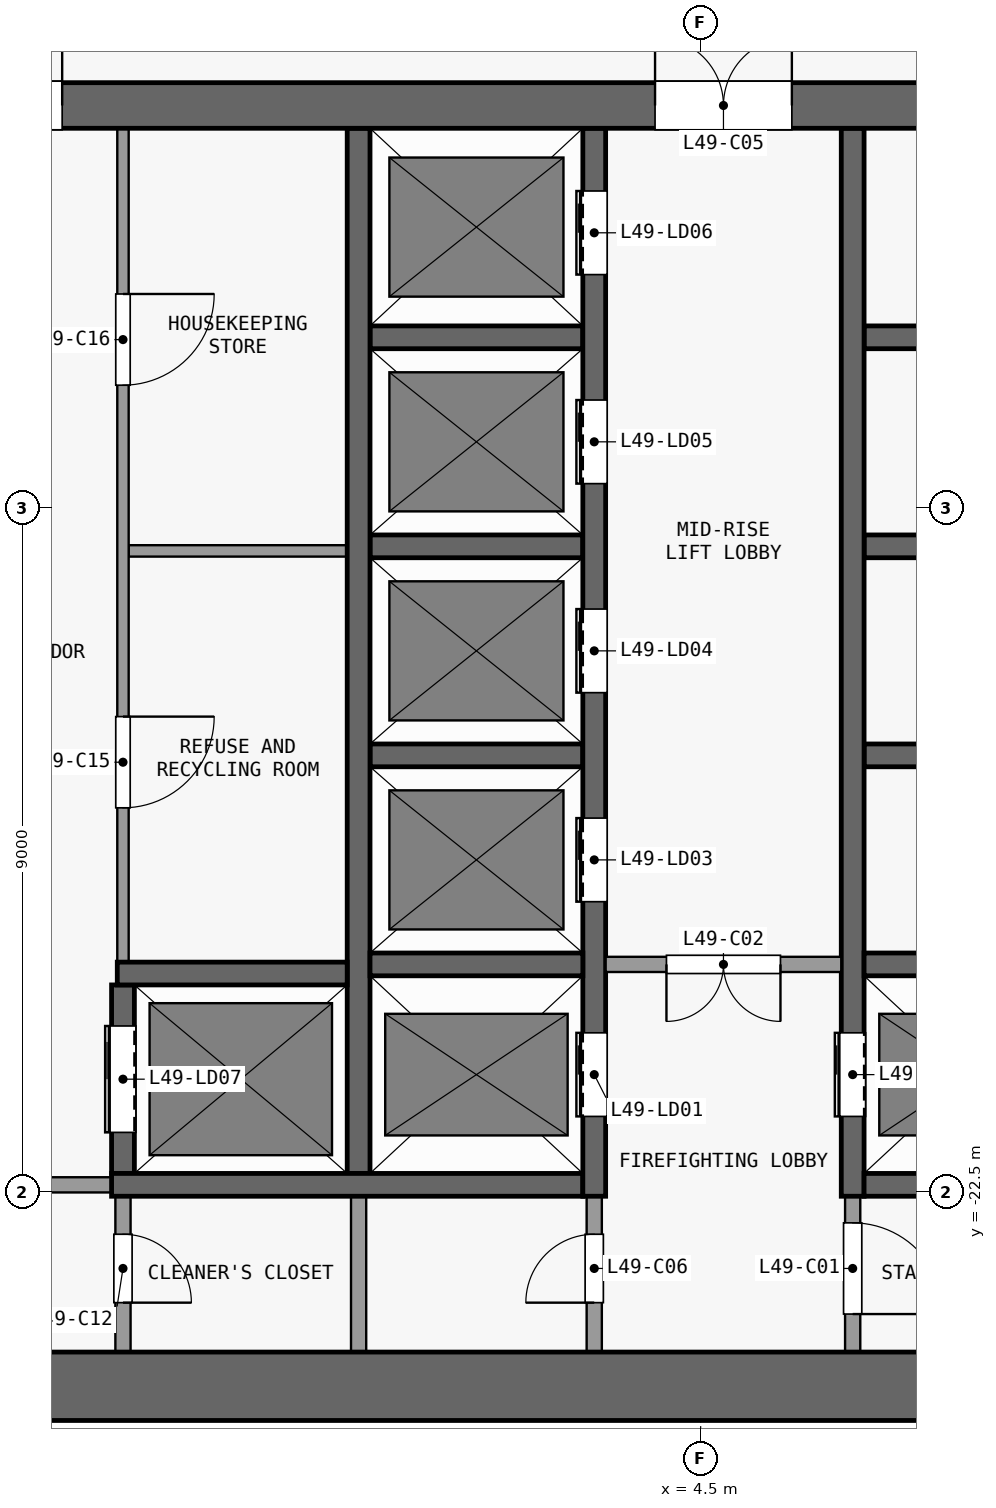
"""IFC4 building model, lengths in metres.
Left out: names, types, materials, properties, quantities, classifications, styles, units other than length and angle.
Written with IfcOpenShell. Run it as: python <this file> out.ifc"""

import sys

from ifc_helpers import new_model, si_unit, direction, frame, frame_2d, origin, place, context, subcontext, project, spatial, rectangle, extrude, element, fill, save


model = new_model("IFC4")
c1 = context("Model", 3, precision=1e-05, world=origin(), true_north=direction((0.0, 1.0)))
c2 = subcontext(c1, "Body", "Model", "MODEL_VIEW")
j1 = project(units=[si_unit("LENGTHUNIT", "METRE"), si_unit("PLANEANGLEUNIT", "RADIAN")], contexts=[c1])
p1 = place(None, origin())
s1 = spatial("IfcSite", under=j1, at=p1, CompositionType="ELEMENT")
p2 = place(p1, origin())
s2 = spatial("IfcBuilding", under=s1, at=p2, CompositionType="ELEMENT")
p3 = place(p2, frame((0.0, 0.0, 196.1)))
s3 = spatial("IfcBuildingStorey", under=s2, at=p3, CompositionType="ELEMENT", Elevation=196.1)
p4 = place(p3, frame((-13.3, -25.05, 0.0), z_axis=(0.0, 0.0, 1.0), x_axis=(1.0, 0.0, 0.0)))
e1 = element("IfcWall", 1, at=p4, inside=s3, PredefinedType="SHEAR", context=c2, shape_type="SweptSolid", body=[
    extrude(rectangle(XDim=26.6, YDim=0.9, at=frame_2d((13.3, 0.0))), origin(), (0.0, 0.0, 1.0), 3.15),
])
p5 = place(p3, frame((-13.3, -8.2, 0.0), z_axis=(0.0, 0.0, 1.0), x_axis=(1.0, 0.0, 0.0)))
e2 = element("IfcWall", 2, at=p5, inside=s3, PredefinedType="SHEAR", context=c2, shape_type="SweptSolid", body=[
    extrude(rectangle(XDim=26.6, YDim=0.6, at=frame_2d((13.3, 0.0))), origin(), (0.0, 0.0, 1.0), 3.15),
])
p6 = place(p5, frame((7.6, 0.0, 0.0)))
e3 = element("IfcOpeningElement", 3, at=p6, cuts=e2, PredefinedType="OPENING", context=c2, shape_type="SweptSolid", body=[
    extrude(rectangle(XDim=1.8, YDim=2.1, at=frame_2d((0.9, 1.05))), frame((0.0, 0.31, 0.0), z_axis=(0.0, -1.0, 0.0), x_axis=(1.0, 0.0, 0.0)), (0.0, 0.0, 1.0), 0.62),
])
p7 = place(p5, frame((17.2, 0.0, 0.0)))
e4 = element("IfcOpeningElement", 4, at=p7, cuts=e2, PredefinedType="OPENING", context=c2, shape_type="SweptSolid", body=[
    extrude(rectangle(XDim=1.8, YDim=2.1, at=frame_2d((0.9, 1.05))), frame((0.0, 0.31, 0.0), z_axis=(0.0, -1.0, 0.0), x_axis=(1.0, 0.0, 0.0)), (0.0, 0.0, 1.0), 0.62),
])
p8 = place(p5, frame((2.525, 0.0, 0.0)))
e5 = element("IfcOpeningElement", 5, at=p8, cuts=e2, PredefinedType="OPENING", context=c2, shape_type="SweptSolid", body=[
    extrude(rectangle(XDim=0.9, YDim=2.1, at=frame_2d((0.45, 1.05))), frame((0.0, 0.31, 0.0), z_axis=(0.0, -1.0, 0.0), x_axis=(1.0, 0.0, 0.0)), (0.0, 0.0, 1.0), 0.62),
])
p9 = place(p5, frame((23.175, 0.0, 0.0)))
e6 = element("IfcOpeningElement", 6, at=p9, cuts=e2, PredefinedType="OPENING", context=c2, shape_type="SweptSolid", body=[
    extrude(rectangle(XDim=0.9, YDim=2.1, at=frame_2d((0.45, 1.05))), frame((0.0, 0.31, 0.0), z_axis=(0.0, -1.0, 0.0), x_axis=(1.0, 0.0, 0.0)), (0.0, 0.0, 1.0), 0.62),
])
p10 = place(p3, frame((-3.25, -22.4, 0.0), z_axis=(0.0, 0.0, 1.0), x_axis=(-1.0, 0.0, 0.0)))
e7 = element("IfcWall", 7, at=p10, inside=s3, PredefinedType="PARTITIONING", context=c2, shape_type="SweptSolid", body=[
    extrude(rectangle(XDim=3.15, YDim=0.2, at=frame_2d((1.575, 0.0))), origin(), (0.0, 0.0, 1.0), 3.15),
])
p11 = place(p10, frame((0.8, 0.0, 0.0)))
e8 = element("IfcOpeningElement", 8, at=p11, cuts=e7, PredefinedType="OPENING", context=c2, shape_type="SweptSolid", body=[
    extrude(rectangle(XDim=1.5, YDim=2.1, at=frame_2d((0.75, 1.05))), frame((0.0, 0.11, 0.0), z_axis=(0.0, -1.0, 0.0), x_axis=(1.0, 0.0, 0.0)), (0.0, 0.0, 1.0), 0.22),
])
p12 = place(p3, frame((-3.25, -22.4, 0.0), z_axis=(0.0, 0.0, 1.0), x_axis=(1.0, 0.0, 0.0)))
e9 = element("IfcWall", 9, at=p12, inside=s3, PredefinedType="SHEAR", context=c2, shape_type="SweptSolid", body=[
    extrude(rectangle(XDim=6.2, YDim=0.3, at=frame_2d((3.1, 0.0))), origin(), (0.0, 0.0, 1.0), 3.15),
])
p13 = place(p3, frame((6.65, -22.4, 0.0), z_axis=(0.0, 0.0, 1.0), x_axis=(1.0, 0.0, 0.0)))
e10 = element("IfcWall", 10, at=p13, inside=s3, PredefinedType="SHEAR", context=c2, shape_type="SweptSolid", body=[
    extrude(rectangle(XDim=2.8, YDim=0.3, at=frame_2d((1.4, 0.0))), origin(), (0.0, 0.0, 1.0), 3.15),
])
p14 = place(p3, frame((-3.175, -19.62, 0.0), z_axis=(0.0, 0.0, 1.0), x_axis=(1.0, 0.0, 0.0)))
e11 = element("IfcWall", 11, at=p14, inside=s3, PredefinedType="SHEAR", context=c2, shape_type="SweptSolid", body=[
    extrude(rectangle(XDim=3.025, YDim=0.3, at=frame_2d((1.513, 0.0))), origin(), (0.0, 0.0, 1.0), 3.15),
])
p15 = place(p3, frame((0.15, -19.5, 0.0), z_axis=(0.0, 0.0, 1.0), x_axis=(1.0, 0.0, 0.0)))
e12 = element("IfcWall", 12, at=p15, inside=s3, PredefinedType="SHEAR", context=c2, shape_type="SweptSolid", body=[
    extrude(rectangle(XDim=2.8, YDim=0.3, at=frame_2d((1.4, 0.0))), origin(), (0.0, 0.0, 1.0), 3.15),
])
p16 = place(p3, frame((6.35, -19.5, 0.0), z_axis=(0.0, 0.0, 1.0), x_axis=(-1.0, 0.0, 0.0)))
e13 = element("IfcWall", 13, at=p16, inside=s3, PredefinedType="PARTITIONING", context=c2, shape_type="SweptSolid", body=[
    extrude(rectangle(XDim=3.1, YDim=0.2, at=frame_2d((1.55, 0.0))), origin(), (0.0, 0.0, 1.0), 3.15),
])
p17 = place(p16, frame((0.8, 0.0, 0.0)))
e14 = element("IfcOpeningElement", 14, at=p17, cuts=e13, PredefinedType="OPENING", context=c2, shape_type="SweptSolid", body=[
    extrude(rectangle(XDim=1.5, YDim=2.1, at=frame_2d((0.75, 1.05))), frame((0.0, 0.11, 0.0), z_axis=(0.0, -1.0, 0.0), x_axis=(1.0, 0.0, 0.0)), (0.0, 0.0, 1.0), 0.22),
])
for number, where, z_axis, x_axis in (
    (15, (6.65, -19.5, 0.0), (0.0, 0.0, 1.0), (1.0, 0.0, 0.0)),
    (16, (0.15, -16.75, 0.0), (0.0, 0.0, 1.0), (1.0, 0.0, 0.0)),
    (17, (6.65, -16.75, 0.0), (0.0, 0.0, 1.0), (1.0, 0.0, 0.0)),
):
    element("IfcWall", number, at=place(p3, frame(where, z_axis=z_axis, x_axis=x_axis)), inside=s3, PredefinedType="SHEAR", context=c2, shape_type="SweptSolid", body=[
        extrude(rectangle(XDim=2.8, YDim=0.3, at=frame_2d((1.4, 0.0))), origin(), (0.0, 0.0, 1.0), 3.15),
    ])
p18 = place(p3, frame((-3.025, -14.06, 0.0), z_axis=(0.0, 0.0, 1.0), x_axis=(1.0, 0.0, 0.0)))
e18 = element("IfcWall", 18, at=p18, inside=s3, PredefinedType="PARTITIONING", context=c2, shape_type="SweptSolid", body=[
    extrude(rectangle(XDim=2.875, YDim=0.15, at=frame_2d((1.438, 0.0))), origin(), (0.0, 0.0, 1.0), 3.15),
])
for number, where, z_axis, x_axis in (
    (19, (0.15, -14.0, 0.0), (0.0, 0.0, 1.0), (1.0, 0.0, 0.0)),
    (20, (6.65, -14.0, 0.0), (0.0, 0.0, 1.0), (1.0, 0.0, 0.0)),
    (21, (0.15, -11.25, 0.0), (0.0, 0.0, 1.0), (1.0, 0.0, 0.0)),
    (22, (6.65, -11.25, 0.0), (0.0, 0.0, 1.0), (1.0, 0.0, 0.0)),
):
    element("IfcWall", number, at=place(p3, frame(where, z_axis=z_axis, x_axis=x_axis)), inside=s3, PredefinedType="SHEAR", context=c2, shape_type="SweptSolid", body=[
        extrude(rectangle(XDim=2.8, YDim=0.3, at=frame_2d((1.4, 0.0))), origin(), (0.0, 0.0, 1.0), 3.15),
    ])
p19 = place(p3, frame((-3.1, -22.55, 0.0), z_axis=(0.0, 0.0, 1.0), x_axis=(0.0, -1.0, 0.0)))
e23 = element("IfcWall", 23, at=p19, inside=s3, PredefinedType="PARTITIONING", context=c2, shape_type="SweptSolid", body=[
    extrude(rectangle(XDim=2.05, YDim=0.2, at=frame_2d((1.025, 0.0))), origin(), (0.0, 0.0, 1.0), 3.15),
])
p20 = place(p19, frame((0.5, 0.0, 0.0)))
e24 = element("IfcOpeningElement", 24, at=p20, cuts=e23, PredefinedType="OPENING", context=c2, shape_type="SweptSolid", body=[
    extrude(rectangle(XDim=0.9, YDim=2.1, at=frame_2d((0.45, 1.05))), frame((0.0, 0.11, 0.0), z_axis=(0.0, -1.0, 0.0), x_axis=(1.0, 0.0, 0.0)), (0.0, 0.0, 1.0), 0.22),
])
p21 = place(p3, frame((-3.1, -22.25, 0.0), z_axis=(0.0, 0.0, 1.0), x_axis=(0.0, 1.0, 0.0)))
e25 = element("IfcWall", 25, at=p21, inside=s3, PredefinedType="SHEAR", context=c2, shape_type="SweptSolid", body=[
    extrude(rectangle(XDim=2.48, YDim=0.3, at=frame_2d((1.24, 0.0))), origin(), (0.0, 0.0, 1.0), 3.15),
])
p22 = place(p21, frame((0.54, 0.0, 0.0)))
e26 = element("IfcOpeningElement", 26, at=p22, cuts=e25, PredefinedType="OPENING", context=c2, shape_type="SweptSolid", body=[
    extrude(rectangle(XDim=1.4, YDim=2.1, at=frame_2d((0.7, 1.05))), frame((0.0, 0.16, 0.0), z_axis=(0.0, -1.0, 0.0), x_axis=(1.0, 0.0, 0.0)), (0.0, 0.0, 1.0), 0.32),
])
p23 = place(p3, frame((-3.1, -8.5, 0.0), z_axis=(0.0, 0.0, 1.0), x_axis=(0.0, -1.0, 0.0)))
e27 = element("IfcWall", 27, at=p23, inside=s3, PredefinedType="PARTITIONING", context=c2, shape_type="SweptSolid", body=[
    extrude(rectangle(XDim=10.97, YDim=0.15, at=frame_2d((5.485, 0.0))), origin(), (0.0, 0.0, 1.0), 3.15),
])
p24 = place(p23, frame((7.74, 0.0, 0.0)))
e28 = element("IfcOpeningElement", 28, at=p24, cuts=e27, PredefinedType="OPENING", context=c2, shape_type="SweptSolid", body=[
    extrude(rectangle(XDim=1.2, YDim=2.1, at=frame_2d((0.6, 1.05))), frame((0.0, 0.085, 0.0), z_axis=(0.0, -1.0, 0.0), x_axis=(1.0, 0.0, 0.0)), (0.0, 0.0, 1.0), 0.17),
])
p25 = place(p23, frame((2.18, 0.0, 0.0)))
e29 = element("IfcOpeningElement", 29, at=p25, cuts=e27, PredefinedType="OPENING", context=c2, shape_type="SweptSolid", body=[
    extrude(rectangle(XDim=1.2, YDim=2.1, at=frame_2d((0.6, 1.05))), frame((0.0, 0.085, 0.0), z_axis=(0.0, -1.0, 0.0), x_axis=(1.0, 0.0, 0.0)), (0.0, 0.0, 1.0), 0.17),
])
p26 = place(p3, frame((0.0, -24.6, 0.0), z_axis=(0.0, 0.0, 1.0), x_axis=(0.0, 1.0, 0.0)))
e30 = element("IfcWall", 30, at=p26, inside=s3, PredefinedType="PARTITIONING", context=c2, shape_type="SweptSolid", body=[
    extrude(rectangle(XDim=2.05, YDim=0.2, at=frame_2d((1.025, 0.0))), origin(), (0.0, 0.0, 1.0), 3.15),
])
p27 = place(p3, frame((0.0, -22.25, 0.0), z_axis=(0.0, 0.0, 1.0), x_axis=(0.0, 1.0, 0.0)))
e31 = element("IfcWall", 31, at=p27, inside=s3, PredefinedType="SHEAR", context=c2, shape_type="SweptSolid", body=[
    extrude(rectangle(XDim=13.75, YDim=0.3, at=frame_2d((6.875, 0.0))), origin(), (0.0, 0.0, 1.0), 3.15),
])
p28 = place(p3, frame((3.1, -24.6, 0.0), z_axis=(0.0, 0.0, 1.0), x_axis=(0.0, 1.0, 0.0)))
e32 = element("IfcWall", 32, at=p28, inside=s3, PredefinedType="PARTITIONING", context=c2, shape_type="SweptSolid", body=[
    extrude(rectangle(XDim=2.05, YDim=0.2, at=frame_2d((1.025, 0.0))), origin(), (0.0, 0.0, 1.0), 3.15),
])
p29 = place(p28, frame((0.65, 0.0, 0.0)))
e33 = element("IfcOpeningElement", 33, at=p29, cuts=e32, PredefinedType="OPENING", context=c2, shape_type="SweptSolid", body=[
    extrude(rectangle(XDim=0.9, YDim=2.1, at=frame_2d((0.45, 1.05))), frame((0.0, 0.11, 0.0), z_axis=(0.0, -1.0, 0.0), x_axis=(1.0, 0.0, 0.0)), (0.0, 0.0, 1.0), 0.22),
])
p30 = place(p3, frame((3.1, -22.55, 0.0), z_axis=(0.0, 0.0, 1.0), x_axis=(0.0, 1.0, 0.0)))
e34 = element("IfcWall", 34, at=p30, inside=s3, PredefinedType="SHEAR", context=c2, shape_type="SweptSolid", body=[
    extrude(rectangle(XDim=14.05, YDim=0.3, at=frame_2d((7.025, 0.0))), origin(), (0.0, 0.0, 1.0), 3.15),
])
p31 = place(p30, frame((1.05, 0.0, 0.0)))
e35 = element("IfcOpeningElement", 35, at=p31, cuts=e34, PredefinedType="OPENING", context=c2, shape_type="SweptSolid", body=[
    extrude(rectangle(XDim=1.1, YDim=2.1, at=frame_2d((0.55, 1.05))), frame((0.0, 0.16, 0.0), z_axis=(0.0, -1.0, 0.0), x_axis=(1.0, 0.0, 0.0)), (0.0, 0.0, 1.0), 0.32),
])
p32 = place(p30, frame((3.875, 0.0, 0.0)))
e36 = element("IfcOpeningElement", 36, at=p32, cuts=e34, PredefinedType="OPENING", context=c2, shape_type="SweptSolid", body=[
    extrude(rectangle(XDim=1.1, YDim=2.1, at=frame_2d((0.55, 1.05))), frame((0.0, 0.16, 0.0), z_axis=(0.0, -1.0, 0.0), x_axis=(1.0, 0.0, 0.0)), (0.0, 0.0, 1.0), 0.32),
])
p33 = place(p30, frame((6.625, 0.0, 0.0)))
e37 = element("IfcOpeningElement", 37, at=p33, cuts=e34, PredefinedType="OPENING", context=c2, shape_type="SweptSolid", body=[
    extrude(rectangle(XDim=1.1, YDim=2.1, at=frame_2d((0.55, 1.05))), frame((0.0, 0.16, 0.0), z_axis=(0.0, -1.0, 0.0), x_axis=(1.0, 0.0, 0.0)), (0.0, 0.0, 1.0), 0.32),
])
p34 = place(p30, frame((9.375, 0.0, 0.0)))
e38 = element("IfcOpeningElement", 38, at=p34, cuts=e34, PredefinedType="OPENING", context=c2, shape_type="SweptSolid", body=[
    extrude(rectangle(XDim=1.1, YDim=2.1, at=frame_2d((0.55, 1.05))), frame((0.0, 0.16, 0.0), z_axis=(0.0, -1.0, 0.0), x_axis=(1.0, 0.0, 0.0)), (0.0, 0.0, 1.0), 0.32),
])
p35 = place(p30, frame((12.125, 0.0, 0.0)))
e39 = element("IfcOpeningElement", 39, at=p35, cuts=e34, PredefinedType="OPENING", context=c2, shape_type="SweptSolid", body=[
    extrude(rectangle(XDim=1.1, YDim=2.1, at=frame_2d((0.55, 1.05))), frame((0.0, 0.16, 0.0), z_axis=(0.0, -1.0, 0.0), x_axis=(1.0, 0.0, 0.0)), (0.0, 0.0, 1.0), 0.32),
])
p36 = place(p3, frame((6.5, -22.55, 0.0), z_axis=(0.0, 0.0, 1.0), x_axis=(0.0, -1.0, 0.0)))
e40 = element("IfcWall", 40, at=p36, inside=s3, PredefinedType="PARTITIONING", context=c2, shape_type="SweptSolid", body=[
    extrude(rectangle(XDim=2.05, YDim=0.2, at=frame_2d((1.025, 0.0))), origin(), (0.0, 0.0, 1.0), 3.15),
])
p37 = place(p36, frame((0.35, 0.0, 0.0)))
e41 = element("IfcOpeningElement", 41, at=p37, cuts=e40, PredefinedType="OPENING", context=c2, shape_type="SweptSolid", body=[
    extrude(rectangle(XDim=1.2, YDim=2.1, at=frame_2d((0.6, 1.05))), frame((0.0, 0.11, 0.0), z_axis=(0.0, -1.0, 0.0), x_axis=(1.0, 0.0, 0.0)), (0.0, 0.0, 1.0), 0.22),
])
p38 = place(p3, frame((6.5, -22.55, 0.0), z_axis=(0.0, 0.0, 1.0), x_axis=(0.0, 1.0, 0.0)))
e42 = element("IfcWall", 42, at=p38, inside=s3, PredefinedType="SHEAR", context=c2, shape_type="SweptSolid", body=[
    extrude(rectangle(XDim=14.05, YDim=0.3, at=frame_2d((7.025, 0.0))), origin(), (0.0, 0.0, 1.0), 3.15),
])
p39 = place(p38, frame((1.05, 0.0, 0.0)))
e43 = element("IfcOpeningElement", 43, at=p39, cuts=e42, PredefinedType="OPENING", context=c2, shape_type="SweptSolid", body=[
    extrude(rectangle(XDim=1.1, YDim=2.1, at=frame_2d((0.55, 1.05))), frame((0.0, 0.16, 0.0), z_axis=(0.0, -1.0, 0.0), x_axis=(1.0, 0.0, 0.0)), (0.0, 0.0, 1.0), 0.32),
])
p40 = place(p31, origin())
e44 = element("IfcDoor", 44, at=p40, inside=s3, OperationType="DOUBLE_DOOR_SLIDING", PredefinedType="DOOR", context=c2, shape_type="SweptSolid", body=[
    extrude(rectangle(XDim=1.1, YDim=2.1, at=frame_2d((0.55, 1.05))), frame((0.0, 0.025, 0.0), z_axis=(0.0, -1.0, 0.0), x_axis=(1.0, 0.0, 0.0)), (0.0, 0.0, 1.0), 0.05),
])
fill(e35, e44)
p41 = place(p39, origin())
e45 = element("IfcDoor", 45, at=p41, inside=s3, OperationType="DOUBLE_DOOR_SLIDING", PredefinedType="DOOR", context=c2, shape_type="SweptSolid", body=[
    extrude(rectangle(XDim=1.1, YDim=2.1, at=frame_2d((0.55, 1.05))), frame((0.0, 0.025, 0.0), z_axis=(0.0, -1.0, 0.0), x_axis=(1.0, 0.0, 0.0)), (0.0, 0.0, 1.0), 0.05),
])
fill(e43, e45)
p42 = place(p32, origin())
e46 = element("IfcDoor", 46, at=p42, inside=s3, OperationType="DOUBLE_DOOR_SLIDING", PredefinedType="DOOR", context=c2, shape_type="SweptSolid", body=[
    extrude(rectangle(XDim=1.1, YDim=2.1, at=frame_2d((0.55, 1.05))), frame((0.0, 0.025, 0.0), z_axis=(0.0, -1.0, 0.0), x_axis=(1.0, 0.0, 0.0)), (0.0, 0.0, 1.0), 0.05),
])
fill(e36, e46)
p43 = place(p33, origin())
e47 = element("IfcDoor", 47, at=p43, inside=s3, OperationType="DOUBLE_DOOR_SLIDING", PredefinedType="DOOR", context=c2, shape_type="SweptSolid", body=[
    extrude(rectangle(XDim=1.1, YDim=2.1, at=frame_2d((0.55, 1.05))), frame((0.0, 0.025, 0.0), z_axis=(0.0, -1.0, 0.0), x_axis=(1.0, 0.0, 0.0)), (0.0, 0.0, 1.0), 0.05),
])
fill(e37, e47)
p44 = place(p34, origin())
e48 = element("IfcDoor", 48, at=p44, inside=s3, OperationType="DOUBLE_DOOR_SLIDING", PredefinedType="DOOR", context=c2, shape_type="SweptSolid", body=[
    extrude(rectangle(XDim=1.1, YDim=2.1, at=frame_2d((0.55, 1.05))), frame((0.0, 0.025, 0.0), z_axis=(0.0, -1.0, 0.0), x_axis=(1.0, 0.0, 0.0)), (0.0, 0.0, 1.0), 0.05),
])
fill(e38, e48)
p45 = place(p35, origin())
e49 = element("IfcDoor", 49, at=p45, inside=s3, OperationType="DOUBLE_DOOR_SLIDING", PredefinedType="DOOR", context=c2, shape_type="SweptSolid", body=[
    extrude(rectangle(XDim=1.1, YDim=2.1, at=frame_2d((0.55, 1.05))), frame((0.0, 0.025, 0.0), z_axis=(0.0, -1.0, 0.0), x_axis=(1.0, 0.0, 0.0)), (0.0, 0.0, 1.0), 0.05),
])
fill(e39, e49)
p46 = place(p22, origin())
e50 = element("IfcDoor", 50, at=p46, inside=s3, OperationType="DOUBLE_DOOR_SLIDING", PredefinedType="DOOR", context=c2, shape_type="SweptSolid", body=[
    extrude(rectangle(XDim=1.4, YDim=2.1, at=frame_2d((0.7, 1.05))), frame((0.0, 0.025, 0.0), z_axis=(0.0, -1.0, 0.0), x_axis=(1.0, 0.0, 0.0)), (0.0, 0.0, 1.0), 0.05),
])
fill(e26, e50)
p47 = place(p37, origin())
e51 = element("IfcDoor", 51, at=p47, inside=s3, OperationType="SINGLE_SWING_RIGHT", PredefinedType="DOOR", context=c2, shape_type="SweptSolid", body=[
    extrude(rectangle(XDim=1.2, YDim=2.1, at=frame_2d((0.6, 1.05))), frame((0.0, 0.025, 0.0), z_axis=(0.0, -1.0, 0.0), x_axis=(1.0, 0.0, 0.0)), (0.0, 0.0, 1.0), 0.05),
])
fill(e41, e51)
p48 = place(p17, origin())
e52 = element("IfcDoor", 52, at=p48, inside=s3, OperationType="DOUBLE_DOOR_SINGLE_SWING", PredefinedType="DOOR", context=c2, shape_type="SweptSolid", body=[
    extrude(rectangle(XDim=1.5, YDim=2.1, at=frame_2d((0.75, 1.05))), frame((0.0, 0.025, 0.0), z_axis=(0.0, -1.0, 0.0), x_axis=(1.0, 0.0, 0.0)), (0.0, 0.0, 1.0), 0.05),
])
fill(e14, e52)
p49 = place(p6, origin())
e53 = element("IfcDoor", 53, at=p49, inside=s3, OperationType="DOUBLE_DOOR_SINGLE_SWING", PredefinedType="DOOR", context=c2, shape_type="SweptSolid", body=[
    extrude(rectangle(XDim=1.8, YDim=2.1, at=frame_2d((0.9, 1.05))), frame((0.0, 0.025, 0.0), z_axis=(0.0, -1.0, 0.0), x_axis=(1.0, 0.0, 0.0)), (0.0, 0.0, 1.0), 0.05),
])
fill(e3, e53)
p50 = place(p7, origin())
e54 = element("IfcDoor", 54, at=p50, inside=s3, OperationType="DOUBLE_DOOR_SINGLE_SWING", PredefinedType="DOOR", context=c2, shape_type="SweptSolid", body=[
    extrude(rectangle(XDim=1.8, YDim=2.1, at=frame_2d((0.9, 1.05))), frame((0.0, 0.025, 0.0), z_axis=(0.0, -1.0, 0.0), x_axis=(1.0, 0.0, 0.0)), (0.0, 0.0, 1.0), 0.05),
])
fill(e4, e54)
p51 = place(p29, origin())
e55 = element("IfcDoor", 55, at=p51, inside=s3, OperationType="SINGLE_SWING_LEFT", PredefinedType="DOOR", context=c2, shape_type="SweptSolid", body=[
    extrude(rectangle(XDim=0.9, YDim=2.1, at=frame_2d((0.45, 1.05))), frame((0.0, 0.025, 0.0), z_axis=(0.0, -1.0, 0.0), x_axis=(1.0, 0.0, 0.0)), (0.0, 0.0, 1.0), 0.05),
])
fill(e33, e55)
p52 = place(p20, origin())
e56 = element("IfcDoor", 56, at=p52, inside=s3, OperationType="SINGLE_SWING_RIGHT", PredefinedType="DOOR", context=c2, shape_type="SweptSolid", body=[
    extrude(rectangle(XDim=0.9, YDim=2.1, at=frame_2d((0.45, 1.05))), frame((0.0, 0.025, 0.0), z_axis=(0.0, -1.0, 0.0), x_axis=(1.0, 0.0, 0.0)), (0.0, 0.0, 1.0), 0.05),
])
fill(e24, e56)
p53 = place(p24, origin())
e57 = element("IfcDoor", 57, at=p53, inside=s3, OperationType="SINGLE_SWING_LEFT", PredefinedType="DOOR", context=c2, shape_type="SweptSolid", body=[
    extrude(rectangle(XDim=1.2, YDim=2.1, at=frame_2d((0.6, 1.05))), frame((0.0, 0.025, 0.0), z_axis=(0.0, -1.0, 0.0), x_axis=(1.0, 0.0, 0.0)), (0.0, 0.0, 1.0), 0.05),
])
fill(e28, e57)
p54 = place(p25, origin())
e58 = element("IfcDoor", 58, at=p54, inside=s3, OperationType="SINGLE_SWING_LEFT", PredefinedType="DOOR", context=c2, shape_type="SweptSolid", body=[
    extrude(rectangle(XDim=1.2, YDim=2.1, at=frame_2d((0.6, 1.05))), frame((0.0, 0.025, 0.0), z_axis=(0.0, -1.0, 0.0), x_axis=(1.0, 0.0, 0.0)), (0.0, 0.0, 1.0), 0.05),
])
fill(e29, e58)
save(model, sys.argv[1])
